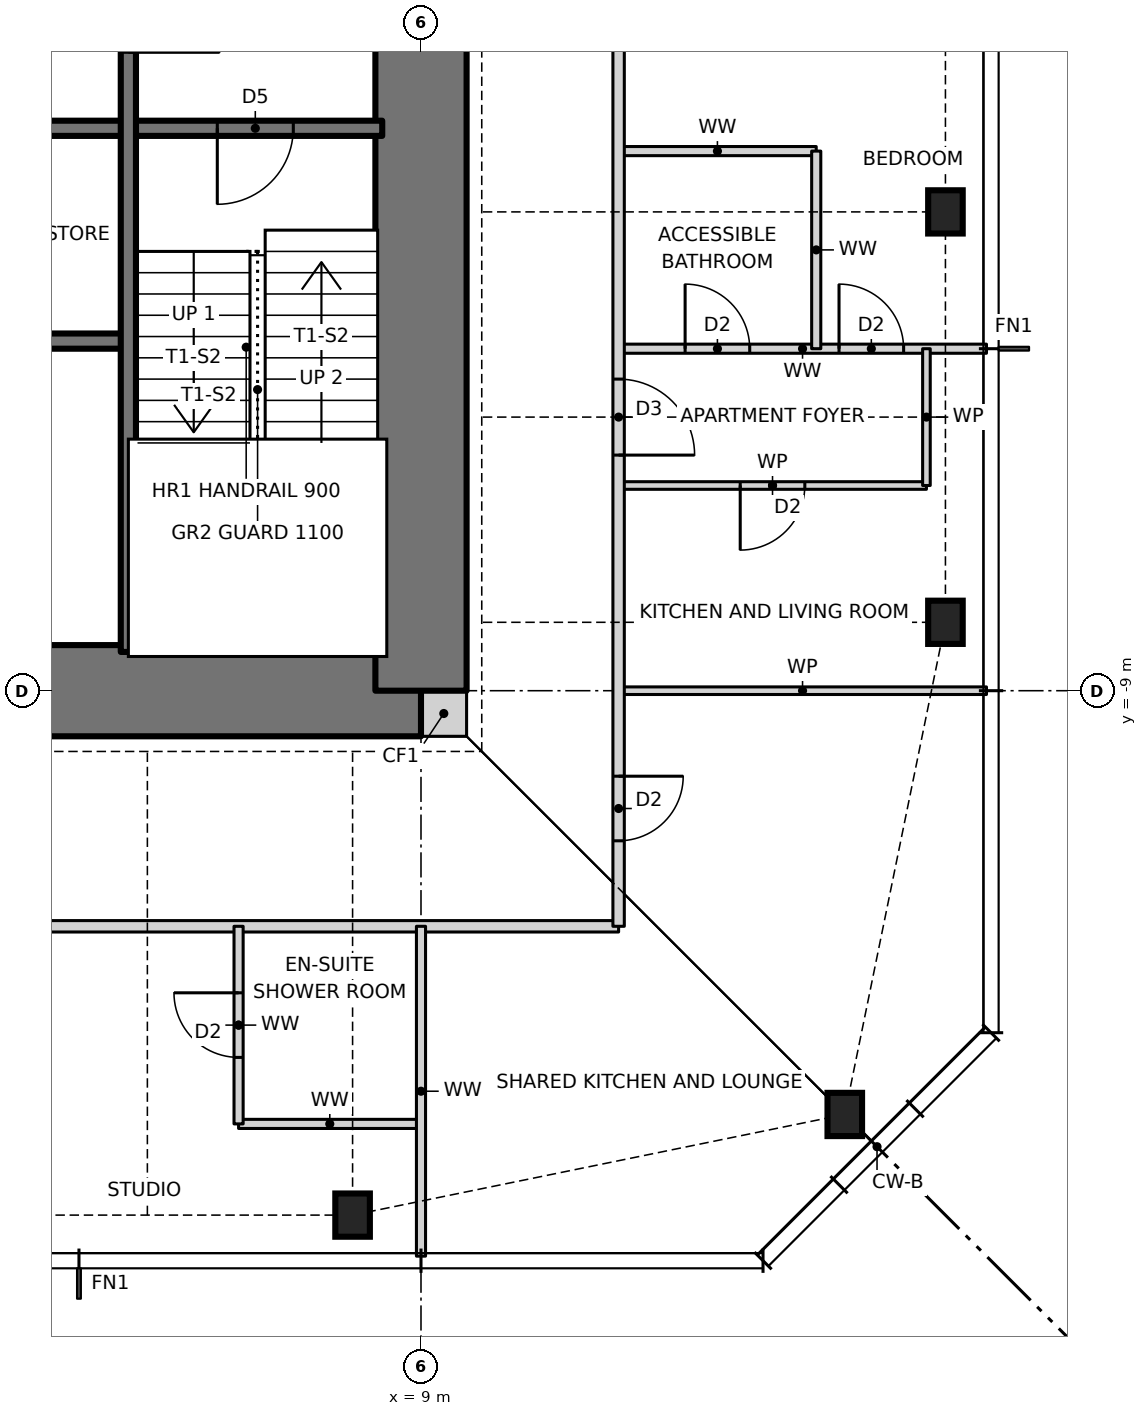
"""IFC4 building model, lengths in metres.
Left out: names, types, materials, properties, quantities, classifications, styles, units other than length and angle.
Written with IfcOpenShell. Run it as: python <this file> out.ifc"""

import sys

from ifc_helpers import new_model, si_unit, direction, frame, frame_2d, origin, origin_2d, place, context, subcontext, project, spatial, rectangle, i_section, extrude, element, fill, save


model = new_model("IFC4")
c1 = context("Model", 3, precision=1e-05, world=origin(), true_north=direction((0.0, 1.0)))
c2 = subcontext(c1, "Body", "Model", "MODEL_VIEW")
j1 = project(units=[si_unit("LENGTHUNIT", "METRE"), si_unit("PLANEANGLEUNIT", "RADIAN")], contexts=[c1])
p1 = place(None, origin())
s1 = spatial("IfcSite", under=j1, at=p1, CompositionType="ELEMENT")
p2 = place(p1, origin())
s2 = spatial("IfcBuilding", under=s1, at=p2, CompositionType="ELEMENT")
p3 = place(p2, frame((0.0, 0.0, 264.0)))
s3 = spatial("IfcBuildingStorey", under=s2, at=p3, CompositionType="ELEMENT", Elevation=264.0)
for number, where, z_axis, x_axis in (
    (1, (8.1, -15.9, 0.0), (0.0, 0.0, 1.0), (1.0, 0.0, 0.0)),
    (2, (14.576, -14.576, 0.0), (0.0, 0.0, 1.0), (1.0, 0.0, 0.0)),
    (3, (15.9, -8.1, 0.0), (0.0, 0.0, 1.0), (1.0, 0.0, 0.0)),
    (4, (15.9, -2.7, 0.0), (0.0, 0.0, 1.0), (1.0, 0.0, 0.0)),
):
    element("IfcColumn", number, at=place(p3, frame(where, z_axis=z_axis, x_axis=x_axis)), inside=s3, PredefinedType="COLUMN", context=c2, shape_type="SweptSolid", body=[
        extrude(i_section(OverallWidth=0.455, OverallDepth=0.569, WebThickness=0.078, FlangeThickness=0.125, at=origin_2d()), origin(), (0.0, 0.0, 1.0), 3.5),
    ])
p4 = place(p3, frame((9.0, -9.3, 0.0), z_axis=(0.0, 0.0, 1.0), x_axis=(1.0, 0.0, 0.0)))
e5 = element("IfcWall", 5, at=p4, inside=s3, PredefinedType="SOLIDWALL", context=c2, shape_type="SweptSolid", body=[
    extrude(rectangle(XDim=0.6, YDim=0.6, at=frame_2d((0.3, 0.0))), origin(), (0.0, 0.0, 1.0), 3.5),
])
p5 = place(p3, frame((-9.0, -9.0, 0.0), z_axis=(0.0, 0.0, 1.0), x_axis=(1.0, 0.0, 0.0)))
e6 = element("IfcWall", 6, at=p5, inside=s3, PredefinedType="SHEAR", context=c2, shape_type="SweptSolid", body=[
    extrude(rectangle(XDim=18.0, YDim=1.2, at=frame_2d((9.0, 0.0))), origin(), (0.0, 0.0, 1.0), 3.5),
])
p6 = place(p5, frame((3.775, 0.0, 0.0)))
e7 = element("IfcOpeningElement", 7, at=p6, cuts=e6, PredefinedType="OPENING", context=c2, shape_type="SweptSolid", body=[
    extrude(rectangle(XDim=0.9, YDim=2.1, at=frame_2d((0.45, 1.05))), frame((0.0, 0.61, 0.0), z_axis=(0.0, -1.0, 0.0), x_axis=(1.0, 0.0, 0.0)), (0.0, 0.0, 1.0), 1.22),
])
p7 = place(p5, frame((10.625, 0.0, 0.0)))
e8 = element("IfcOpeningElement", 8, at=p7, cuts=e6, PredefinedType="OPENING", context=c2, shape_type="SweptSolid", body=[
    extrude(rectangle(XDim=0.9, YDim=2.1, at=frame_2d((0.45, 1.05))), frame((0.0, 0.61, 0.0), z_axis=(0.0, -1.0, 0.0), x_axis=(1.0, 0.0, 0.0)), (0.0, 0.0, 1.0), 1.22),
])
p8 = place(p3, frame((9.0, -9.0, 0.0), z_axis=(0.0, 0.0, 1.0), x_axis=(0.0, 1.0, 0.0)))
e9 = element("IfcWall", 9, at=p8, inside=s3, PredefinedType="SHEAR", context=c2, shape_type="SweptSolid", body=[
    extrude(rectangle(XDim=18.0, YDim=1.2, at=frame_2d((9.0, 0.0))), origin(), (0.0, 0.0, 1.0), 3.5),
])
p9 = place(p8, frame((8.5, 0.0, 0.0)))
e10 = element("IfcOpeningElement", 10, at=p9, cuts=e9, PredefinedType="OPENING", context=c2, shape_type="SweptSolid", body=[
    extrude(rectangle(XDim=1.0, YDim=2.1, at=frame_2d((0.5, 1.05))), frame((0.0, 0.61, 0.0), z_axis=(0.0, -1.0, 0.0), x_axis=(1.0, 0.0, 0.0)), (0.0, 0.0, 1.0), 1.22),
])
p10 = place(p3, frame((6.6, -14.7, 0.0), z_axis=(0.0, 0.0, 1.0), x_axis=(1.0, 0.0, 0.0)))
e11 = element("IfcWall", 11, at=p10, inside=s3, PredefinedType="PARTITIONING", context=c2, shape_type="SweptSolid", body=[
    extrude(rectangle(XDim=2.4, YDim=0.12, at=frame_2d((1.2, 0.0))), origin(), (0.0, 0.0, 1.0), 3.25),
])
p11 = place(p3, frame((-11.6, -12.1, 0.0), z_axis=(0.0, 0.0, 1.0), x_axis=(1.0, 0.0, 0.0)))
e12 = element("IfcWall", 12, at=p11, inside=s3, PredefinedType="PARTITIONING", context=c2, shape_type="SweptSolid", body=[
    extrude(rectangle(XDim=23.2, YDim=0.15, at=frame_2d((11.6, 0.0))), origin(), (0.0, 0.0, 1.0), 3.25),
])
p12 = place(p11, frame((6.2, 0.0, 0.0)))
e13 = element("IfcOpeningElement", 13, at=p12, cuts=e12, PredefinedType="OPENING", context=c2, shape_type="SweptSolid", body=[
    extrude(rectangle(XDim=1.8, YDim=2.1, at=frame_2d((0.9, 1.05))), frame((0.0, 0.085, 0.0), z_axis=(0.0, -1.0, 0.0), x_axis=(1.0, 0.0, 0.0)), (0.0, 0.0, 1.0), 0.17),
])
p13 = place(p11, frame((13.35, 0.0, 0.0)))
e14 = element("IfcOpeningElement", 14, at=p13, cuts=e12, PredefinedType="OPENING", context=c2, shape_type="SweptSolid", body=[
    extrude(rectangle(XDim=1.0, YDim=2.1, at=frame_2d((0.5, 1.05))), frame((0.0, 0.085, 0.0), z_axis=(0.0, -1.0, 0.0), x_axis=(1.0, 0.0, 0.0)), (0.0, 0.0, 1.0), 0.17),
])
p14 = place(p3, frame((11.6, -9.0, 0.0), z_axis=(0.0, 0.0, 1.0), x_axis=(1.0, 0.0, 0.0)))
e15 = element("IfcWall", 15, at=p14, inside=s3, PredefinedType="PARTITIONING", context=c2, shape_type="SweptSolid", body=[
    extrude(rectangle(XDim=4.84, YDim=0.1, at=frame_2d((2.42, 0.0))), origin(), (0.0, 0.0, 1.0), 3.25),
])
p15 = place(p3, frame((11.6, -6.3, 0.0), z_axis=(0.0, 0.0, 1.0), x_axis=(1.0, 0.0, 0.0)))
e16 = element("IfcWall", 16, at=p15, inside=s3, PredefinedType="PARTITIONING", context=c2, shape_type="SweptSolid", body=[
    extrude(rectangle(XDim=4.05, YDim=0.1, at=frame_2d((2.025, 0.0))), origin(), (0.0, 0.0, 1.0), 3.25),
])
p16 = place(p15, frame((1.6, 0.0, 0.0)))
e17 = element("IfcOpeningElement", 17, at=p16, cuts=e16, PredefinedType="OPENING", context=c2, shape_type="SweptSolid", body=[
    extrude(rectangle(XDim=0.85, YDim=2.1, at=frame_2d((0.425, 1.05))), frame((0.0, 0.06, 0.0), z_axis=(0.0, -1.0, 0.0), x_axis=(1.0, 0.0, 0.0)), (0.0, 0.0, 1.0), 0.12),
])
p17 = place(p3, frame((11.6, -4.5, 0.0), z_axis=(0.0, 0.0, 1.0), x_axis=(1.0, 0.0, 0.0)))
e18 = element("IfcWall", 18, at=p17, inside=s3, PredefinedType="PARTITIONING", context=c2, shape_type="SweptSolid", body=[
    extrude(rectangle(XDim=4.84, YDim=0.12, at=frame_2d((2.42, 0.0))), origin(), (0.0, 0.0, 1.0), 3.25),
])
p18 = place(p17, frame((2.9, 0.0, 0.0)))
e19 = element("IfcOpeningElement", 19, at=p18, cuts=e18, PredefinedType="OPENING", context=c2, shape_type="SweptSolid", body=[
    extrude(rectangle(XDim=0.85, YDim=2.1, at=frame_2d((0.425, 1.05))), frame((0.0, 0.07, 0.0), z_axis=(0.0, -1.0, 0.0), x_axis=(1.0, 0.0, 0.0)), (0.0, 0.0, 1.0), 0.14),
])
p19 = place(p17, frame((0.875, 0.0, 0.0)))
e20 = element("IfcOpeningElement", 20, at=p19, cuts=e18, PredefinedType="OPENING", context=c2, shape_type="SweptSolid", body=[
    extrude(rectangle(XDim=0.85, YDim=2.1, at=frame_2d((0.425, 1.05))), frame((0.0, 0.07, 0.0), z_axis=(0.0, -1.0, 0.0), x_axis=(1.0, 0.0, 0.0)), (0.0, 0.0, 1.0), 0.14),
])
p20 = place(p3, frame((-8.49, -4.4, 0.0), z_axis=(0.0, 0.0, 1.0), x_axis=(1.0, 0.0, 0.0)))
e21 = element("IfcWall", 21, at=p20, inside=s3, PredefinedType="SOLIDWALL", context=c2, shape_type="SweptSolid", body=[
    extrude(rectangle(XDim=13.64, YDim=0.2, at=frame_2d((6.82, 0.0))), origin(), (0.0, 0.0, 1.0), 3.5),
])
p21 = place(p3, frame((11.6, -1.9, 0.0), z_axis=(0.0, 0.0, 1.0), x_axis=(1.0, 0.0, 0.0)))
e22 = element("IfcWall", 22, at=p21, inside=s3, PredefinedType="PARTITIONING", context=c2, shape_type="SweptSolid", body=[
    extrude(rectangle(XDim=2.6, YDim=0.12, at=frame_2d((1.3, 0.0))), origin(), (0.0, 0.0, 1.0), 3.25),
])
p22 = place(p3, frame((-8.49, -1.6, 0.0), z_axis=(0.0, 0.0, 1.0), x_axis=(1.0, 0.0, 0.0)))
e23 = element("IfcWall", 23, at=p22, inside=s3, PredefinedType="SOLIDWALL", context=c2, shape_type="SweptSolid", body=[
    extrude(rectangle(XDim=16.98, YDim=0.2, at=frame_2d((8.49, 0.0))), origin(), (0.0, 0.0, 1.0), 3.5),
])
p23 = place(p22, frame((14.81, 0.0, 0.0)))
e24 = element("IfcOpeningElement", 24, at=p23, cuts=e23, PredefinedType="OPENING", context=c2, shape_type="SweptSolid", body=[
    extrude(rectangle(XDim=1.0, YDim=2.1, at=frame_2d((0.5, 1.05))), frame((0.0, 0.11, 0.0), z_axis=(0.0, -1.0, 0.0), x_axis=(1.0, 0.0, 0.0)), (0.0, 0.0, 1.0), 0.22),
])
p24 = place(p22, frame((1.232, 0.0, 0.0)))
e25 = element("IfcOpeningElement", 25, at=p24, cuts=e23, PredefinedType="OPENING", context=c2, shape_type="SweptSolid", body=[
    extrude(rectangle(XDim=0.9, YDim=2.1, at=frame_2d((0.45, 1.05))), frame((0.0, 0.11, 0.0), z_axis=(0.0, -1.0, 0.0), x_axis=(1.0, 0.0, 0.0)), (0.0, 0.0, 1.0), 0.22),
])
p25 = place(p22, frame((4.627, 0.0, 0.0)))
e26 = element("IfcOpeningElement", 26, at=p25, cuts=e23, PredefinedType="OPENING", context=c2, shape_type="SweptSolid", body=[
    extrude(rectangle(XDim=0.9, YDim=2.1, at=frame_2d((0.45, 1.05))), frame((0.0, 0.11, 0.0), z_axis=(0.0, -1.0, 0.0), x_axis=(1.0, 0.0, 0.0)), (0.0, 0.0, 1.0), 0.22),
])
p26 = place(p22, frame((8.052, 0.0, 0.0)))
e27 = element("IfcOpeningElement", 27, at=p26, cuts=e23, PredefinedType="OPENING", context=c2, shape_type="SweptSolid", body=[
    extrude(rectangle(XDim=0.9, YDim=2.1, at=frame_2d((0.45, 1.05))), frame((0.0, 0.11, 0.0), z_axis=(0.0, -1.0, 0.0), x_axis=(1.0, 0.0, 0.0)), (0.0, 0.0, 1.0), 0.22),
])
p27 = place(p22, frame((11.478, 0.0, 0.0)))
e28 = element("IfcOpeningElement", 28, at=p27, cuts=e23, PredefinedType="OPENING", context=c2, shape_type="SweptSolid", body=[
    extrude(rectangle(XDim=0.9, YDim=2.1, at=frame_2d((0.45, 1.05))), frame((0.0, 0.11, 0.0), z_axis=(0.0, -1.0, 0.0), x_axis=(1.0, 0.0, 0.0)), (0.0, 0.0, 1.0), 0.22),
])
p28 = place(p3, frame((15.65, -6.3, 0.0), z_axis=(0.0, 0.0, 1.0), x_axis=(0.0, 1.0, 0.0)))
e29 = element("IfcWall", 29, at=p28, inside=s3, PredefinedType="PARTITIONING", context=c2, shape_type="SweptSolid", body=[
    extrude(rectangle(XDim=1.8, YDim=0.1, at=frame_2d((0.9, 0.0))), origin(), (0.0, 0.0, 1.0), 3.25),
])
p29 = place(p3, frame((14.2, -4.5, 0.0), z_axis=(0.0, 0.0, 1.0), x_axis=(0.0, 1.0, 0.0)))
e30 = element("IfcWall", 30, at=p29, inside=s3, PredefinedType="PARTITIONING", context=c2, shape_type="SweptSolid", body=[
    extrude(rectangle(XDim=2.6, YDim=0.12, at=frame_2d((1.3, 0.0))), origin(), (0.0, 0.0, 1.0), 3.25),
])
p30 = place(p3, frame((11.6, -12.1, 0.0), z_axis=(0.0, 0.0, 1.0), x_axis=(0.0, 1.0, 0.0)))
e31 = element("IfcWall", 31, at=p30, inside=s3, PredefinedType="PARTITIONING", context=c2, shape_type="SweptSolid", body=[
    extrude(rectangle(XDim=23.7, YDim=0.15, at=frame_2d((11.85, 0.0))), origin(), (0.0, 0.0, 1.0), 3.25),
])
p31 = place(p30, frame((6.2, 0.0, 0.0)))
e32 = element("IfcOpeningElement", 32, at=p31, cuts=e31, PredefinedType="OPENING", context=c2, shape_type="SweptSolid", body=[
    extrude(rectangle(XDim=1.0, YDim=2.1, at=frame_2d((0.5, 1.05))), frame((0.0, 0.085, 0.0), z_axis=(0.0, -1.0, 0.0), x_axis=(1.0, 0.0, 0.0)), (0.0, 0.0, 1.0), 0.17),
])
p32 = place(p30, frame((12.65, 0.0, 0.0)))
e33 = element("IfcOpeningElement", 33, at=p32, cuts=e31, PredefinedType="OPENING", context=c2, shape_type="SweptSolid", body=[
    extrude(rectangle(XDim=1.0, YDim=2.1, at=frame_2d((0.5, 1.05))), frame((0.0, 0.085, 0.0), z_axis=(0.0, -1.0, 0.0), x_axis=(1.0, 0.0, 0.0)), (0.0, 0.0, 1.0), 0.17),
])
p33 = place(p30, frame((19.55, 0.0, 0.0)))
e34 = element("IfcOpeningElement", 34, at=p33, cuts=e31, PredefinedType="OPENING", context=c2, shape_type="SweptSolid", body=[
    extrude(rectangle(XDim=1.0, YDim=2.1, at=frame_2d((0.5, 1.05))), frame((0.0, 0.085, 0.0), z_axis=(0.0, -1.0, 0.0), x_axis=(1.0, 0.0, 0.0)), (0.0, 0.0, 1.0), 0.17),
])
p34 = place(p30, frame((21.5, 0.0, 0.0)))
e35 = element("IfcOpeningElement", 35, at=p34, cuts=e31, PredefinedType="OPENING", context=c2, shape_type="SweptSolid", body=[
    extrude(rectangle(XDim=1.8, YDim=2.1, at=frame_2d((0.9, 1.05))), frame((0.0, 0.085, 0.0), z_axis=(0.0, -1.0, 0.0), x_axis=(1.0, 0.0, 0.0)), (0.0, 0.0, 1.0), 0.17),
])
p35 = place(p30, frame((1.125, 0.0, 0.0)))
e36 = element("IfcOpeningElement", 36, at=p35, cuts=e31, PredefinedType="OPENING", context=c2, shape_type="SweptSolid", body=[
    extrude(rectangle(XDim=0.85, YDim=2.1, at=frame_2d((0.425, 1.05))), frame((0.0, 0.085, 0.0), z_axis=(0.0, -1.0, 0.0), x_axis=(1.0, 0.0, 0.0)), (0.0, 0.0, 1.0), 0.17),
])
p36 = place(p3, frame((9.0, -16.44, 0.0), z_axis=(0.0, 0.0, 1.0), x_axis=(0.0, 1.0, 0.0)))
e37 = element("IfcWall", 37, at=p36, inside=s3, PredefinedType="PARTITIONING", context=c2, shape_type="SweptSolid", body=[
    extrude(rectangle(XDim=4.34, YDim=0.12, at=frame_2d((2.17, 0.0))), origin(), (0.0, 0.0, 1.0), 3.25),
])
p37 = place(p3, frame((6.6, -14.7, 0.0), z_axis=(0.0, 0.0, 1.0), x_axis=(0.0, 1.0, 0.0)))
e38 = element("IfcWall", 38, at=p37, inside=s3, PredefinedType="PARTITIONING", context=c2, shape_type="SweptSolid", body=[
    extrude(rectangle(XDim=2.6, YDim=0.12, at=frame_2d((1.3, 0.0))), origin(), (0.0, 0.0, 1.0), 3.25),
])
p38 = place(p37, frame((0.875, 0.0, 0.0)))
e39 = element("IfcOpeningElement", 39, at=p38, cuts=e38, PredefinedType="OPENING", context=c2, shape_type="SweptSolid", body=[
    extrude(rectangle(XDim=0.85, YDim=2.1, at=frame_2d((0.425, 1.05))), frame((0.0, 0.07, 0.0), z_axis=(0.0, -1.0, 0.0), x_axis=(1.0, 0.0, 0.0)), (0.0, 0.0, 1.0), 0.14),
])
p39 = place(p3, frame((5.15, -8.49, 0.0), z_axis=(0.0, 0.0, 1.0), x_axis=(0.0, 1.0, 0.0)))
e40 = element("IfcWall", 40, at=p39, inside=s3, PredefinedType="SOLIDWALL", context=c2, shape_type="SweptSolid", body=[
    extrude(rectangle(XDim=13.09, YDim=0.2, at=frame_2d((6.545, 0.0))), origin(), (0.0, 0.0, 1.0), 3.5),
])
p40 = place(p39, frame((7.89, 0.0, 0.0)))
e41 = element("IfcOpeningElement", 41, at=p40, cuts=e40, PredefinedType="OPENING", context=c2, shape_type="SweptSolid", body=[
    extrude(rectangle(XDim=1.2, YDim=2.1, at=frame_2d((0.6, 1.05))), frame((0.0, 0.11, 0.0), z_axis=(0.0, -1.0, 0.0), x_axis=(1.0, 0.0, 0.0)), (0.0, 0.0, 1.0), 0.22),
])
p41 = place(p23, frame((1.0, 0.0, 0.0), z_axis=(0.0, 0.0, 1.0), x_axis=(-1.0, 0.0, 0.0)))
e42 = element("IfcDoor", 42, at=p41, inside=s3, OperationType="SINGLE_SWING_RIGHT", PredefinedType="DOOR", context=c2, shape_type="SweptSolid", body=[
    extrude(rectangle(XDim=1.0, YDim=2.1, at=frame_2d((0.5, 1.05))), frame((0.0, 0.025, 0.0), z_axis=(0.0, -1.0, 0.0), x_axis=(1.0, 0.0, 0.0)), (0.0, 0.0, 1.0), 0.05),
])
fill(e24, e42)
p42 = place(p40, frame((1.2, 0.0, 0.0), z_axis=(0.0, 0.0, 1.0), x_axis=(-1.0, 0.0, 0.0)))
e43 = element("IfcDoor", 43, at=p42, inside=s3, OperationType="SINGLE_SWING_RIGHT", PredefinedType="DOOR", context=c2, shape_type="SweptSolid", body=[
    extrude(rectangle(XDim=1.2, YDim=2.1, at=frame_2d((0.6, 1.05))), frame((0.0, 0.025, 0.0), z_axis=(0.0, -1.0, 0.0), x_axis=(1.0, 0.0, 0.0)), (0.0, 0.0, 1.0), 0.05),
])
fill(e41, e43)
p43 = place(p38, origin())
e44 = element("IfcDoor", 44, at=p43, inside=s3, OperationType="SINGLE_SWING_RIGHT", PredefinedType="DOOR", context=c2, shape_type="SweptSolid", body=[
    extrude(rectangle(XDim=0.85, YDim=2.1, at=frame_2d((0.425, 1.05))), frame((0.0, 0.025, 0.0), z_axis=(0.0, -1.0, 0.0), x_axis=(1.0, 0.0, 0.0)), (0.0, 0.0, 1.0), 0.05),
])
fill(e39, e44)
p44 = place(p31, frame((1.0, 0.0, 0.0), z_axis=(0.0, 0.0, 1.0), x_axis=(-1.0, 0.0, 0.0)))
e45 = element("IfcDoor", 45, at=p44, inside=s3, OperationType="SINGLE_SWING_RIGHT", PredefinedType="DOOR", context=c2, shape_type="SweptSolid", body=[
    extrude(rectangle(XDim=1.0, YDim=2.1, at=frame_2d((0.5, 1.05))), frame((0.0, 0.025, 0.0), z_axis=(0.0, -1.0, 0.0), x_axis=(1.0, 0.0, 0.0)), (0.0, 0.0, 1.0), 0.05),
])
fill(e32, e45)
p45 = place(p16, frame((0.85, 0.0, 0.0), z_axis=(0.0, 0.0, 1.0), x_axis=(-1.0, 0.0, 0.0)))
e46 = element("IfcDoor", 46, at=p45, inside=s3, OperationType="SINGLE_SWING_RIGHT", PredefinedType="DOOR", context=c2, shape_type="SweptSolid", body=[
    extrude(rectangle(XDim=0.85, YDim=2.1, at=frame_2d((0.425, 1.05))), frame((0.0, 0.025, 0.0), z_axis=(0.0, -1.0, 0.0), x_axis=(1.0, 0.0, 0.0)), (0.0, 0.0, 1.0), 0.05),
])
fill(e17, e46)
p46 = place(p18, origin())
e47 = element("IfcDoor", 47, at=p46, inside=s3, OperationType="SINGLE_SWING_LEFT", PredefinedType="DOOR", context=c2, shape_type="SweptSolid", body=[
    extrude(rectangle(XDim=0.85, YDim=2.1, at=frame_2d((0.425, 1.05))), frame((0.0, 0.025, 0.0), z_axis=(0.0, -1.0, 0.0), x_axis=(1.0, 0.0, 0.0)), (0.0, 0.0, 1.0), 0.05),
])
fill(e19, e47)
p47 = place(p19, origin())
e48 = element("IfcDoor", 48, at=p47, inside=s3, OperationType="SINGLE_SWING_LEFT", PredefinedType="DOOR", context=c2, shape_type="SweptSolid", body=[
    extrude(rectangle(XDim=0.85, YDim=2.1, at=frame_2d((0.425, 1.05))), frame((0.0, 0.025, 0.0), z_axis=(0.0, -1.0, 0.0), x_axis=(1.0, 0.0, 0.0)), (0.0, 0.0, 1.0), 0.05),
])
fill(e20, e48)
p48 = place(p35, frame((0.85, 0.0, 0.0), z_axis=(0.0, 0.0, 1.0), x_axis=(-1.0, 0.0, 0.0)))
e49 = element("IfcDoor", 49, at=p48, inside=s3, OperationType="SINGLE_SWING_LEFT", PredefinedType="DOOR", context=c2, shape_type="SweptSolid", body=[
    extrude(rectangle(XDim=0.85, YDim=2.1, at=frame_2d((0.425, 1.05))), frame((0.0, 0.025, 0.0), z_axis=(0.0, -1.0, 0.0), x_axis=(1.0, 0.0, 0.0)), (0.0, 0.0, 1.0), 0.05),
])
fill(e36, e49)
save(model, sys.argv[1])
